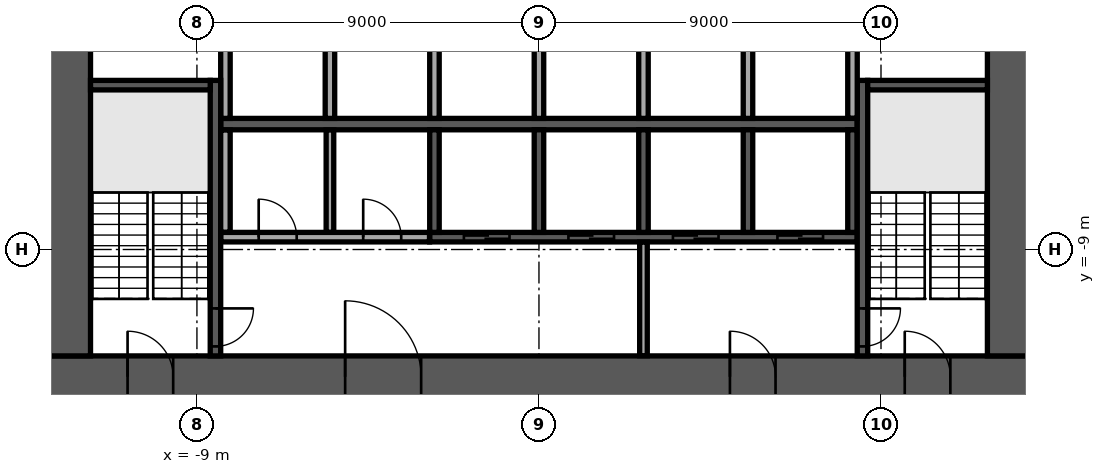
"""IFC4 building model, lengths in metres.
Left out: names, types, materials, properties, quantities, classifications, styles, units other than length and angle.
Written with IfcOpenShell. Run it as: python <this file> out.ifc"""

import sys

from ifc_helpers import new_model, si_unit, direction, frame, frame_2d, origin, place, context, subcontext, project, spatial, rectangle, extrude, element, fill, save


model = new_model("IFC4")
c1 = context("Model", 3, precision=1e-05, world=origin(), true_north=direction((0.0, 1.0)))
c2 = subcontext(c1, "Body", "Model", "MODEL_VIEW")
j1 = project(units=[si_unit("LENGTHUNIT", "METRE"), si_unit("PLANEANGLEUNIT", "RADIAN")], contexts=[c1])
p1 = place(None, origin())
s1 = spatial("IfcSite", under=j1, at=p1, CompositionType="ELEMENT")
p2 = place(p1, origin())
s2 = spatial("IfcBuilding", under=s1, at=p2, CompositionType="ELEMENT")
p3 = place(p2, frame((0.0, 0.0, 114.1)))
s3 = spatial("IfcBuildingStorey", under=s2, at=p3, CompositionType="ELEMENT", Elevation=114.1)
p4 = place(p3, frame((-12.9, -12.35, 0.0), z_axis=(0.0, 0.0, 1.0), x_axis=(1.0, 0.0, 0.0)))
e1 = element("IfcWall", 1, at=p4, inside=s3, PredefinedType="SHEAR", context=c2, shape_type="SweptSolid", body=[
    extrude(rectangle(XDim=25.8, YDim=1.1, at=frame_2d((12.9, 0.0))), origin(), (0.0, 0.0, 1.0), 3.58),
])
p5 = place(p4, frame((7.8, 0.0, 0.0)))
e2 = element("IfcOpeningElement", 2, at=p5, cuts=e1, PredefinedType="OPENING", context=c2, shape_type="SweptSolid", body=[
    extrude(rectangle(XDim=2.0, YDim=2.1, at=frame_2d((1.0, 1.05))), frame((0.0, 0.56, 0.0), z_axis=(0.0, -1.0, 0.0), x_axis=(1.0, 0.0, 0.0)), (0.0, 0.0, 1.0), 1.12),
])
p6 = place(p4, frame((17.925, 0.0, 0.0)))
e3 = element("IfcOpeningElement", 3, at=p6, cuts=e1, PredefinedType="OPENING", context=c2, shape_type="SweptSolid", body=[
    extrude(rectangle(XDim=1.2, YDim=2.1, at=frame_2d((0.6, 1.05))), frame((0.0, 0.56, 0.0), z_axis=(0.0, -1.0, 0.0), x_axis=(1.0, 0.0, 0.0)), (0.0, 0.0, 1.0), 1.12),
])
p7 = place(p4, frame((2.075, 0.0, 0.0)))
e4 = element("IfcOpeningElement", 4, at=p7, cuts=e1, PredefinedType="OPENING", context=c2, shape_type="SweptSolid", body=[
    extrude(rectangle(XDim=1.2, YDim=2.1, at=frame_2d((0.6, 1.05))), frame((0.0, 0.56, 0.0), z_axis=(0.0, -1.0, 0.0), x_axis=(1.0, 0.0, 0.0)), (0.0, 0.0, 1.0), 1.12),
])
p8 = place(p4, frame((22.525, 0.0, 0.0)))
e5 = element("IfcOpeningElement", 5, at=p8, cuts=e1, PredefinedType="OPENING", context=c2, shape_type="SweptSolid", body=[
    extrude(rectangle(XDim=1.2, YDim=2.1, at=frame_2d((0.6, 1.05))), frame((0.0, 0.56, 0.0), z_axis=(0.0, -1.0, 0.0), x_axis=(1.0, 0.0, 0.0)), (0.0, 0.0, 1.0), 1.12),
])
p9 = place(p3, frame((12.35, -11.8, 0.0), z_axis=(0.0, 0.0, 1.0), x_axis=(0.0, 1.0, 0.0)))
e6 = element("IfcWall", 6, at=p9, inside=s3, PredefinedType="SHEAR", context=c2, shape_type="SweptSolid", body=[
    extrude(rectangle(XDim=23.6, YDim=1.1, at=frame_2d((11.8, 0.0))), origin(), (0.0, 0.0, 1.0), 3.58),
])
p10 = place(p9, frame((10.6, 0.0, 0.0)))
e7 = element("IfcOpeningElement", 7, at=p10, cuts=e6, PredefinedType="OPENING", context=c2, shape_type="SweptSolid", body=[
    extrude(rectangle(XDim=2.4, YDim=2.4, at=frame_2d((1.2, 1.2))), frame((0.0, 0.56, 0.0), z_axis=(0.0, -1.0, 0.0), x_axis=(1.0, 0.0, 0.0)), (0.0, 0.0, 1.0), 1.12),
])
p11 = place(p3, frame((-12.35, -11.8, 0.0), z_axis=(0.0, 0.0, 1.0), x_axis=(0.0, 1.0, 0.0)))
e8 = element("IfcWall", 8, at=p11, inside=s3, PredefinedType="SHEAR", context=c2, shape_type="SweptSolid", body=[
    extrude(rectangle(XDim=23.6, YDim=1.1, at=frame_2d((11.8, 0.0))), origin(), (0.0, 0.0, 1.0), 3.58),
])
p12 = place(p11, frame((10.6, 0.0, 0.0)))
e9 = element("IfcOpeningElement", 9, at=p12, cuts=e8, PredefinedType="OPENING", context=c2, shape_type="SweptSolid", body=[
    extrude(rectangle(XDim=2.4, YDim=2.4, at=frame_2d((1.2, 1.2))), frame((0.0, 0.56, 0.0), z_axis=(0.0, -1.0, 0.0), x_axis=(1.0, 0.0, 0.0)), (0.0, 0.0, 1.0), 1.12),
])
p13 = place(p3, frame((-8.375, -5.7, 0.0), z_axis=(0.0, 0.0, 1.0), x_axis=(1.0, 0.0, 0.0)))
e10 = element("IfcWall", 10, at=p13, inside=s3, PredefinedType="SOLIDWALL", context=c2, shape_type="SweptSolid", body=[
    extrude(rectangle(XDim=16.75, YDim=0.3, at=frame_2d((8.375, 0.0))), origin(), (0.0, 0.0, 1.0), 3.58),
])
for number, where, z_axis, x_axis in (
    (11, (-8.25, -5.55, 0.0), (0.0, 0.0, 1.0), (0.0, 1.0, 0.0)),
    (12, (-5.5, -5.55, 0.0), (0.0, 0.0, 1.0), (0.0, 1.0, 0.0)),
    (13, (-2.75, -5.55, 0.0), (0.0, 0.0, 1.0), (0.0, 1.0, 0.0)),
    (14, (0.0, -5.55, 0.0), (0.0, 0.0, 1.0), (0.0, 1.0, 0.0)),
    (15, (2.75, -5.55, 0.0), (0.0, 0.0, 1.0), (0.0, 1.0, 0.0)),
    (16, (5.5, -5.55, 0.0), (0.0, 0.0, 1.0), (0.0, 1.0, 0.0)),
):
    element("IfcWall", number, at=place(p3, frame(where, z_axis=z_axis, x_axis=x_axis)), inside=s3, PredefinedType="SOLIDWALL", context=c2, shape_type="SweptSolid", body=[
        extrude(rectangle(XDim=2.7, YDim=0.25, at=frame_2d((1.35, 0.0))), origin(), (0.0, 0.0, 1.0), 3.58),
    ])
p14 = place(p3, frame((-2.875, -8.675, 0.0), z_axis=(0.0, 0.0, 1.0), x_axis=(1.0, 0.0, 0.0)))
e17 = element("IfcWall", 17, at=p14, inside=s3, PredefinedType="SOLIDWALL", context=c2, shape_type="SweptSolid", body=[
    extrude(rectangle(XDim=11.25, YDim=0.25, at=frame_2d((5.625, 0.0))), origin(), (0.0, 0.0, 1.0), 3.58),
])
p15 = place(p14, frame((0.9, 0.0, 0.0)))
e18 = element("IfcOpeningElement", 18, at=p15, cuts=e17, PredefinedType="OPENING", context=c2, shape_type="SweptSolid", body=[
    extrude(rectangle(XDim=1.2, YDim=2.1, at=frame_2d((0.6, 1.05))), frame((0.0, 0.135, 0.0), z_axis=(0.0, -1.0, 0.0), x_axis=(1.0, 0.0, 0.0)), (0.0, 0.0, 1.0), 0.27),
])
p16 = place(p14, frame((3.65, 0.0, 0.0)))
e19 = element("IfcOpeningElement", 19, at=p16, cuts=e17, PredefinedType="OPENING", context=c2, shape_type="SweptSolid", body=[
    extrude(rectangle(XDim=1.2, YDim=2.1, at=frame_2d((0.6, 1.05))), frame((0.0, 0.135, 0.0), z_axis=(0.0, -1.0, 0.0), x_axis=(1.0, 0.0, 0.0)), (0.0, 0.0, 1.0), 0.27),
])
p17 = place(p14, frame((6.4, 0.0, 0.0)))
e20 = element("IfcOpeningElement", 20, at=p17, cuts=e17, PredefinedType="OPENING", context=c2, shape_type="SweptSolid", body=[
    extrude(rectangle(XDim=1.2, YDim=2.1, at=frame_2d((0.6, 1.05))), frame((0.0, 0.135, 0.0), z_axis=(0.0, -1.0, 0.0), x_axis=(1.0, 0.0, 0.0)), (0.0, 0.0, 1.0), 0.27),
])
p18 = place(p14, frame((9.15, 0.0, 0.0)))
e21 = element("IfcOpeningElement", 21, at=p18, cuts=e17, PredefinedType="OPENING", context=c2, shape_type="SweptSolid", body=[
    extrude(rectangle(XDim=1.2, YDim=2.1, at=frame_2d((0.6, 1.05))), frame((0.0, 0.135, 0.0), z_axis=(0.0, -1.0, 0.0), x_axis=(1.0, 0.0, 0.0)), (0.0, 0.0, 1.0), 0.27),
])
for number, where, z_axis, x_axis in (
    (22, (-2.75, -8.55, 0.0), (0.0, 0.0, 1.0), (0.0, 1.0, 0.0)),
    (23, (0.0, -8.55, 0.0), (0.0, 0.0, 1.0), (0.0, 1.0, 0.0)),
    (24, (2.75, -8.55, 0.0), (0.0, 0.0, 1.0), (0.0, 1.0, 0.0)),
    (25, (5.5, -8.55, 0.0), (0.0, 0.0, 1.0), (0.0, 1.0, 0.0)),
    (26, (8.25, -8.55, 0.0), (0.0, 0.0, 1.0), (0.0, 1.0, 0.0)),
):
    element("IfcWall", number, at=place(p3, frame(where, z_axis=z_axis, x_axis=x_axis)), inside=s3, PredefinedType="SOLIDWALL", context=c2, shape_type="SweptSolid", body=[
        extrude(rectangle(XDim=2.7, YDim=0.25, at=frame_2d((1.35, 0.0))), origin(), (0.0, 0.0, 1.0), 3.58),
    ])
p19 = place(p3, frame((-8.512, -4.55, 0.0), z_axis=(0.0, 0.0, 1.0), x_axis=(0.0, -1.0, 0.0)))
e27 = element("IfcWall", 27, at=p19, inside=s3, PredefinedType="SOLIDWALL", context=c2, shape_type="SweptSolid", body=[
    extrude(rectangle(XDim=7.25, YDim=0.275, at=frame_2d((3.625, 0.0))), origin(), (0.0, 0.0, 1.0), 3.58),
])
p20 = place(p19, frame((6.0, 0.0, 0.0)))
e28 = element("IfcOpeningElement", 28, at=p20, cuts=e27, PredefinedType="OPENING", context=c2, shape_type="SweptSolid", body=[
    extrude(rectangle(XDim=1.0, YDim=2.1, at=frame_2d((0.5, 1.05))), frame((0.0, 0.147, 0.0), z_axis=(0.0, -1.0, 0.0), x_axis=(1.0, 0.0, 0.0)), (0.0, 0.0, 1.0), 0.295),
])
p21 = place(p3, frame((-8.65, -4.675, 0.0), z_axis=(0.0, 0.0, 1.0), x_axis=(-1.0, 0.0, 0.0)))
e29 = element("IfcWall", 29, at=p21, inside=s3, PredefinedType="SOLIDWALL", context=c2, shape_type="SweptSolid", body=[
    extrude(rectangle(XDim=3.15, YDim=0.25, at=frame_2d((1.575, 0.0))), origin(), (0.0, 0.0, 1.0), 3.58),
])
p22 = place(p3, frame((8.512, -4.55, 0.0), z_axis=(0.0, 0.0, 1.0), x_axis=(0.0, -1.0, 0.0)))
e30 = element("IfcWall", 30, at=p22, inside=s3, PredefinedType="SOLIDWALL", context=c2, shape_type="SweptSolid", body=[
    extrude(rectangle(XDim=7.25, YDim=0.275, at=frame_2d((3.625, 0.0))), origin(), (0.0, 0.0, 1.0), 3.58),
])
p23 = place(p22, frame((6.0, 0.0, 0.0)))
e31 = element("IfcOpeningElement", 31, at=p23, cuts=e30, PredefinedType="OPENING", context=c2, shape_type="SweptSolid", body=[
    extrude(rectangle(XDim=1.0, YDim=2.1, at=frame_2d((0.5, 1.05))), frame((0.0, 0.147, 0.0), z_axis=(0.0, -1.0, 0.0), x_axis=(1.0, 0.0, 0.0)), (0.0, 0.0, 1.0), 0.295),
])
p24 = place(p3, frame((8.65, -4.675, 0.0), z_axis=(0.0, 0.0, 1.0), x_axis=(1.0, 0.0, 0.0)))
e32 = element("IfcWall", 32, at=p24, inside=s3, PredefinedType="SOLIDWALL", context=c2, shape_type="SweptSolid", body=[
    extrude(rectangle(XDim=3.15, YDim=0.25, at=frame_2d((1.575, 0.0))), origin(), (0.0, 0.0, 1.0), 3.58),
])
p25 = place(p3, frame((2.75, -11.795, 0.0), z_axis=(0.0, 0.0, 1.0), x_axis=(0.0, 1.0, 0.0)))
e33 = element("IfcWall", 33, at=p25, inside=s3, PredefinedType="PARTITIONING", context=c2, shape_type="SweptSolid", body=[
    extrude(rectangle(XDim=2.99, YDim=0.2, at=frame_2d((1.495, 0.0))), origin(), (0.0, 0.0, 1.0), 3.58),
])
p26 = place(p3, frame((-8.37, -8.675, 0.0), z_axis=(0.0, 0.0, 1.0), x_axis=(1.0, 0.0, 0.0)))
e34 = element("IfcWall", 34, at=p26, inside=s3, PredefinedType="PARTITIONING", context=c2, shape_type="SweptSolid", body=[
    extrude(rectangle(XDim=5.49, YDim=0.25, at=frame_2d((2.745, 0.0))), origin(), (0.0, 0.0, 1.0), 3.58),
])
p27 = place(p26, frame((0.995, 0.0, 0.0)))
e35 = element("IfcOpeningElement", 35, at=p27, cuts=e34, PredefinedType="OPENING", context=c2, shape_type="SweptSolid", body=[
    extrude(rectangle(XDim=1.0, YDim=2.1, at=frame_2d((0.5, 1.05))), frame((0.0, 0.135, 0.0), z_axis=(0.0, -1.0, 0.0), x_axis=(1.0, 0.0, 0.0)), (0.0, 0.0, 1.0), 0.27),
])
p28 = place(p26, frame((3.745, 0.0, 0.0)))
e36 = element("IfcOpeningElement", 36, at=p28, cuts=e34, PredefinedType="OPENING", context=c2, shape_type="SweptSolid", body=[
    extrude(rectangle(XDim=1.0, YDim=2.1, at=frame_2d((0.5, 1.05))), frame((0.0, 0.135, 0.0), z_axis=(0.0, -1.0, 0.0), x_axis=(1.0, 0.0, 0.0)), (0.0, 0.0, 1.0), 0.27),
])
p29 = place(p3, frame((-8.25, -8.545, 0.0), z_axis=(0.0, 0.0, 1.0), x_axis=(0.0, 1.0, 0.0)))
e37 = element("IfcWall", 37, at=p29, inside=s3, PredefinedType="PARTITIONING", context=c2, shape_type="SweptSolid", body=[
    extrude(rectangle(XDim=2.69, YDim=0.25, at=frame_2d((1.345, 0.0))), origin(), (0.0, 0.0, 1.0), 3.58),
])
p30 = place(p3, frame((-5.5, -8.545, 0.0), z_axis=(0.0, 0.0, 1.0), x_axis=(0.0, 1.0, 0.0)))
e38 = element("IfcWall", 38, at=p30, inside=s3, PredefinedType="PARTITIONING", context=c2, shape_type="SweptSolid", body=[
    extrude(rectangle(XDim=2.69, YDim=0.2, at=frame_2d((1.345, 0.0))), origin(), (0.0, 0.0, 1.0), 3.58),
])
p31 = place(p3, frame((8.25, -5.545, 0.0), z_axis=(0.0, 0.0, 1.0), x_axis=(0.0, 1.0, 0.0)))
e39 = element("IfcWall", 39, at=p31, inside=s3, PredefinedType="PARTITIONING", context=c2, shape_type="SweptSolid", body=[
    extrude(rectangle(XDim=2.69, YDim=0.25, at=frame_2d((1.345, 0.0))), origin(), (0.0, 0.0, 1.0), 3.58),
])
p32 = place(p5, origin())
e40 = element("IfcDoor", 40, at=p32, inside=s3, OperationType="SINGLE_SWING_LEFT", PredefinedType="DOOR", context=c2, shape_type="SweptSolid", body=[
    extrude(rectangle(XDim=2.0, YDim=2.1, at=frame_2d((1.0, 1.05))), frame((0.0, 0.025, 0.0), z_axis=(0.0, -1.0, 0.0), x_axis=(1.0, 0.0, 0.0)), (0.0, 0.0, 1.0), 0.05),
])
fill(e2, e40)
p33 = place(p6, origin())
e41 = element("IfcDoor", 41, at=p33, inside=s3, OperationType="SINGLE_SWING_LEFT", PredefinedType="DOOR", context=c2, shape_type="SweptSolid", body=[
    extrude(rectangle(XDim=1.2, YDim=2.1, at=frame_2d((0.6, 1.05))), frame((0.0, 0.025, 0.0), z_axis=(0.0, -1.0, 0.0), x_axis=(1.0, 0.0, 0.0)), (0.0, 0.0, 1.0), 0.05),
])
fill(e3, e41)
p34 = place(p7, origin())
e42 = element("IfcDoor", 42, at=p34, inside=s3, OperationType="SINGLE_SWING_LEFT", PredefinedType="DOOR", context=c2, shape_type="SweptSolid", body=[
    extrude(rectangle(XDim=1.2, YDim=2.1, at=frame_2d((0.6, 1.05))), frame((0.0, 0.025, 0.0), z_axis=(0.0, -1.0, 0.0), x_axis=(1.0, 0.0, 0.0)), (0.0, 0.0, 1.0), 0.05),
])
fill(e4, e42)
p35 = place(p8, origin())
e43 = element("IfcDoor", 43, at=p35, inside=s3, OperationType="SINGLE_SWING_LEFT", PredefinedType="DOOR", context=c2, shape_type="SweptSolid", body=[
    extrude(rectangle(XDim=1.2, YDim=2.1, at=frame_2d((0.6, 1.05))), frame((0.0, 0.025, 0.0), z_axis=(0.0, -1.0, 0.0), x_axis=(1.0, 0.0, 0.0)), (0.0, 0.0, 1.0), 0.05),
])
fill(e5, e43)
p36 = place(p15, origin())
e44 = element("IfcDoor", 44, at=p36, inside=s3, OperationType="DOUBLE_DOOR_SLIDING", PredefinedType="DOOR", context=c2, shape_type="SweptSolid", body=[
    extrude(rectangle(XDim=1.2, YDim=2.1, at=frame_2d((0.6, 1.05))), frame((0.0, 0.025, 0.0), z_axis=(0.0, -1.0, 0.0), x_axis=(1.0, 0.0, 0.0)), (0.0, 0.0, 1.0), 0.05),
])
fill(e18, e44)
p37 = place(p16, origin())
e45 = element("IfcDoor", 45, at=p37, inside=s3, OperationType="DOUBLE_DOOR_SLIDING", PredefinedType="DOOR", context=c2, shape_type="SweptSolid", body=[
    extrude(rectangle(XDim=1.2, YDim=2.1, at=frame_2d((0.6, 1.05))), frame((0.0, 0.025, 0.0), z_axis=(0.0, -1.0, 0.0), x_axis=(1.0, 0.0, 0.0)), (0.0, 0.0, 1.0), 0.05),
])
fill(e19, e45)
p38 = place(p17, origin())
e46 = element("IfcDoor", 46, at=p38, inside=s3, OperationType="DOUBLE_DOOR_SLIDING", PredefinedType="DOOR", context=c2, shape_type="SweptSolid", body=[
    extrude(rectangle(XDim=1.2, YDim=2.1, at=frame_2d((0.6, 1.05))), frame((0.0, 0.025, 0.0), z_axis=(0.0, -1.0, 0.0), x_axis=(1.0, 0.0, 0.0)), (0.0, 0.0, 1.0), 0.05),
])
fill(e20, e46)
p39 = place(p18, origin())
e47 = element("IfcDoor", 47, at=p39, inside=s3, OperationType="DOUBLE_DOOR_SLIDING", PredefinedType="DOOR", context=c2, shape_type="SweptSolid", body=[
    extrude(rectangle(XDim=1.2, YDim=2.1, at=frame_2d((0.6, 1.05))), frame((0.0, 0.025, 0.0), z_axis=(0.0, -1.0, 0.0), x_axis=(1.0, 0.0, 0.0)), (0.0, 0.0, 1.0), 0.05),
])
fill(e21, e47)
p40 = place(p20, origin())
e48 = element("IfcDoor", 48, at=p40, inside=s3, OperationType="SINGLE_SWING_LEFT", PredefinedType="DOOR", context=c2, shape_type="SweptSolid", body=[
    extrude(rectangle(XDim=1.0, YDim=2.1, at=frame_2d((0.5, 1.05))), frame((0.0, 0.025, 0.0), z_axis=(0.0, -1.0, 0.0), x_axis=(1.0, 0.0, 0.0)), (0.0, 0.0, 1.0), 0.05),
])
fill(e28, e48)
p41 = place(p23, origin())
e49 = element("IfcDoor", 49, at=p41, inside=s3, OperationType="SINGLE_SWING_LEFT", PredefinedType="DOOR", context=c2, shape_type="SweptSolid", body=[
    extrude(rectangle(XDim=1.0, YDim=2.1, at=frame_2d((0.5, 1.05))), frame((0.0, 0.025, 0.0), z_axis=(0.0, -1.0, 0.0), x_axis=(1.0, 0.0, 0.0)), (0.0, 0.0, 1.0), 0.05),
])
fill(e31, e49)
p42 = place(p27, origin())
e50 = element("IfcDoor", 50, at=p42, inside=s3, OperationType="SINGLE_SWING_LEFT", PredefinedType="DOOR", context=c2, shape_type="SweptSolid", body=[
    extrude(rectangle(XDim=1.0, YDim=2.1, at=frame_2d((0.5, 1.05))), frame((0.0, 0.025, 0.0), z_axis=(0.0, -1.0, 0.0), x_axis=(1.0, 0.0, 0.0)), (0.0, 0.0, 1.0), 0.05),
])
fill(e35, e50)
p43 = place(p28, origin())
e51 = element("IfcDoor", 51, at=p43, inside=s3, OperationType="SINGLE_SWING_LEFT", PredefinedType="DOOR", context=c2, shape_type="SweptSolid", body=[
    extrude(rectangle(XDim=1.0, YDim=2.1, at=frame_2d((0.5, 1.05))), frame((0.0, 0.025, 0.0), z_axis=(0.0, -1.0, 0.0), x_axis=(1.0, 0.0, 0.0)), (0.0, 0.0, 1.0), 0.05),
])
fill(e36, e51)
save(model, sys.argv[1])
